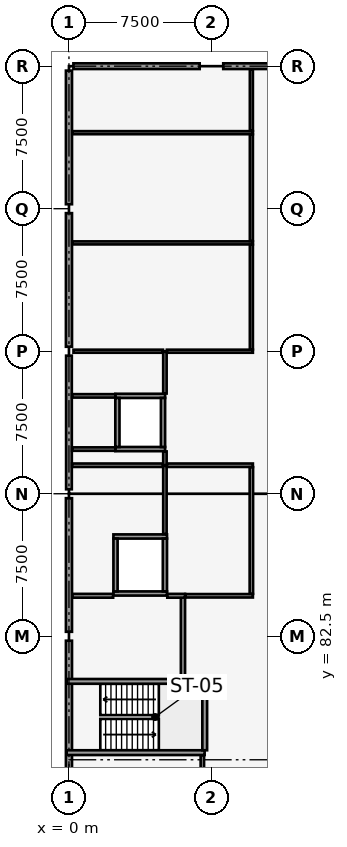
"""IFC4 building model, lengths in metres.
Left out: names, types, materials, properties, quantities, classifications, styles, units other than length and angle.
Written with IfcOpenShell. Run it as: python <this file> out.ifc"""

import sys

from ifc_helpers import new_model, si_unit, direction, frame, frame_2d, origin, origin_2d, place, context, subcontext, project, spatial, rectangle, extrude, element, fill, save


model = new_model("IFC4")
c1 = context("Model", 3, precision=1e-05, world=origin(), true_north=direction((0.0, 1.0)))
c2 = subcontext(c1, "Body", "Model", "MODEL_VIEW")
j1 = project(units=[si_unit("LENGTHUNIT", "METRE"), si_unit("PLANEANGLEUNIT", "RADIAN")], contexts=[c1])
p1 = place(None, origin())
s1 = spatial("IfcSite", under=j1, at=p1, CompositionType="ELEMENT")
p2 = place(p1, origin())
s2 = spatial("IfcBuilding", under=s1, at=p2, CompositionType="ELEMENT")
p3 = place(p2, frame((0.0, 0.0, 21.0)))
s3 = spatial("IfcBuildingStorey", under=s2, at=p3, CompositionType="ELEMENT", Elevation=21.0)
for number, where, z_axis, x_axis in (
    (1, (0.0, 82.5, 0.0), (0.0, 0.0, 1.0), (1.0, 0.0, 0.0)),
    (2, (0.0, 90.0, 0.0), (0.0, 0.0, 1.0), (1.0, 0.0, 0.0)),
    (3, (0.0, 97.5, 0.0), (0.0, 0.0, 1.0), (1.0, 0.0, 0.0)),
    (4, (0.0, 105.0, 0.0), (0.0, 0.0, 1.0), (1.0, 0.0, 0.0)),
    (5, (0.0, 112.5, 0.0), (0.0, 0.0, 1.0), (1.0, 0.0, 0.0)),
):
    element("IfcColumn", number, at=place(p3, frame(where, z_axis=z_axis, x_axis=x_axis)), inside=s3, PredefinedType="COLUMN", context=c2, shape_type="SweptSolid", body=[
        extrude(rectangle(XDim=0.45, YDim=0.45, at=origin_2d()), origin(), (0.0, 0.0, 1.0), 4.2),
    ])
p4 = place(p3, frame((0.235, 112.5, 0.0), z_axis=(0.0, 0.0, 1.0), x_axis=(1.0, 0.0, 0.0)))
e6 = element("IfcWall", 6, at=p4, inside=s3, PredefinedType="SOLIDWALL", context=c2, shape_type="SweptSolid", body=[
    extrude(rectangle(XDim=6.645, YDim=0.3, at=frame_2d((3.322, 0.0))), origin(), (0.0, 0.0, 1.0), 2.89),
])
p5 = place(p4, frame((2.79, 0.0, 0.6)))
e7 = element("IfcOpeningElement", 7, at=p5, cuts=e6, PredefinedType="OPENING", context=c2, shape_type="SweptSolid", body=[
    extrude(rectangle(XDim=1.45, YDim=1.3, at=frame_2d((0.725, 0.65))), frame((0.0, 0.16, 0.0), z_axis=(0.0, -1.0, 0.0), x_axis=(1.0, 0.0, 0.0)), (0.0, 0.0, 1.0), 0.32),
])
p6 = place(p3, frame((8.12, 112.5, 0.0), z_axis=(0.0, 0.0, 1.0), x_axis=(1.0, 0.0, 0.0)))
e8 = element("IfcWall", 8, at=p6, inside=s3, PredefinedType="SOLIDWALL", context=c2, shape_type="SweptSolid", body=[
    extrude(rectangle(XDim=6.645, YDim=0.3, at=frame_2d((3.322, 0.0))), origin(), (0.0, 0.0, 1.0), 2.89),
])
p7 = place(p6, frame((2.33, 0.0, 0.6)))
e9 = element("IfcOpeningElement", 9, at=p7, cuts=e8, PredefinedType="OPENING", context=c2, shape_type="SweptSolid", body=[
    extrude(rectangle(XDim=1.6, YDim=1.3, at=frame_2d((0.8, 0.65))), frame((0.0, 0.16, 0.0), z_axis=(0.0, -1.0, 0.0), x_axis=(1.0, 0.0, 0.0)), (0.0, 0.0, 1.0), 0.32),
])
for number, where, z_axis, x_axis in (
    (10, (0.0, 75.235, 0.0), (0.0, 0.0, 1.0), (0.0, 1.0, 0.0)),
    (11, (0.0, 82.735, 0.0), (0.0, 0.0, 1.0), (0.0, 1.0, 0.0)),
):
    element("IfcWall", number, at=place(p3, frame(where, z_axis=z_axis, x_axis=x_axis)), inside=s3, PredefinedType="SOLIDWALL", context=c2, shape_type="SweptSolid", body=[
        extrude(rectangle(XDim=7.03, YDim=0.32, at=frame_2d((3.515, 0.0))), origin(), (0.0, 0.0, 1.0), 2.89),
    ])
p8 = place(p3, frame((0.0, 90.235, 0.0), z_axis=(0.0, 0.0, 1.0), x_axis=(0.0, 1.0, 0.0)))
e12 = element("IfcWall", 12, at=p8, inside=s3, PredefinedType="SOLIDWALL", context=c2, shape_type="SweptSolid", body=[
    extrude(rectangle(XDim=7.03, YDim=0.3, at=frame_2d((3.515, 0.0))), origin(), (0.0, 0.0, 1.0), 2.89),
])
p9 = place(p8, frame((2.765, 0.0, 0.6)))
e13 = element("IfcOpeningElement", 13, at=p9, cuts=e12, PredefinedType="OPENING", context=c2, shape_type="SweptSolid", body=[
    extrude(rectangle(XDim=1.5, YDim=1.2, at=frame_2d((0.75, 0.6))), frame((0.0, 0.16, 0.0), z_axis=(0.0, -1.0, 0.0), x_axis=(1.0, 0.0, 0.0)), (0.0, 0.0, 1.0), 0.32),
])
p10 = place(p8, frame((5.163, 0.0, 0.6)))
e14 = element("IfcOpeningElement", 14, at=p10, cuts=e12, PredefinedType="OPENING", context=c2, shape_type="SweptSolid", body=[
    extrude(rectangle(XDim=1.65, YDim=1.15, at=frame_2d((0.825, 0.575))), frame((0.0, 0.16, 0.0), z_axis=(0.0, -1.0, 0.0), x_axis=(1.0, 0.0, 0.0)), (0.0, 0.0, 1.0), 0.32),
])
for number, where, z_axis, x_axis in (
    (15, (0.0, 97.735, 0.0), (0.0, 0.0, 1.0), (0.0, 1.0, 0.0)),
    (16, (0.0, 105.235, 0.0), (0.0, 0.0, 1.0), (0.0, 1.0, 0.0)),
):
    element("IfcWall", number, at=place(p3, frame(where, z_axis=z_axis, x_axis=x_axis)), inside=s3, PredefinedType="SOLIDWALL", context=c2, shape_type="SweptSolid", body=[
        extrude(rectangle(XDim=7.03, YDim=0.32, at=frame_2d((3.515, 0.0))), origin(), (0.0, 0.0, 1.0), 2.89),
    ])
p11 = place(p3, frame((-0.12, 76.375, 0.0), z_axis=(0.0, 0.0, 1.0), x_axis=(1.0, 0.0, 0.0)))
e17 = element("IfcWall", 17, at=p11, inside=s3, PredefinedType="SOLIDWALL", context=c2, shape_type="SweptSolid", body=[
    extrude(rectangle(XDim=7.26, YDim=0.25, at=frame_2d((3.63, 0.0))), origin(), (0.0, 0.0, 1.0), 3.92),
])
p12 = place(p3, frame((-0.12, 80.125, 0.0), z_axis=(0.0, 0.0, 1.0), x_axis=(1.0, 0.0, 0.0)))
e18 = element("IfcWall", 18, at=p12, inside=s3, PredefinedType="SOLIDWALL", context=c2, shape_type="SweptSolid", body=[
    extrude(rectangle(XDim=7.26, YDim=0.25, at=frame_2d((3.63, 0.0))), origin(), (0.0, 0.0, 1.0), 3.92),
])
p13 = place(p12, frame((0.45, 0.0, 0.0)))
e19 = element("IfcOpeningElement", 19, at=p13, cuts=e18, PredefinedType="OPENING", context=c2, shape_type="SweptSolid", body=[
    extrude(rectangle(XDim=1.1, YDim=2.15, at=frame_2d((0.55, 1.075))), frame((0.0, 0.135, 0.0), z_axis=(0.0, -1.0, 0.0), x_axis=(1.0, 0.0, 0.0)), (0.0, 0.0, 1.0), 0.27),
])
p14 = place(p3, frame((7.145, 76.5, 0.0), z_axis=(0.0, 0.0, 1.0), x_axis=(0.0, 1.0, 0.0)))
e20 = element("IfcWall", 20, at=p14, inside=s3, PredefinedType="SOLIDWALL", context=c2, shape_type="SweptSolid", body=[
    extrude(rectangle(XDim=3.5, YDim=0.25, at=frame_2d((1.75, 0.0))), origin(), (0.0, 0.0, 1.0), 3.92),
])
for number, where, z_axis, x_axis in (
    (21, (2.44, 92.35, 0.0), (0.0, 0.0, 1.0), (1.0, 0.0, 0.0)),
    (22, (2.44, 95.15, 0.0), (0.0, 0.0, 1.0), (1.0, 0.0, 0.0)),
):
    element("IfcWall", number, at=place(p3, frame(where, z_axis=z_axis, x_axis=x_axis)), inside=s3, PredefinedType="SOLIDWALL", context=c2, shape_type="SweptSolid", body=[
        extrude(rectangle(XDim=2.62, YDim=0.22, at=frame_2d((1.31, 0.0))), origin(), (0.0, 0.0, 1.0), 3.92),
    ])
p15 = place(p3, frame((2.55, 92.46, 0.0), z_axis=(0.0, 0.0, 1.0), x_axis=(0.0, 1.0, 0.0)))
e23 = element("IfcWall", 23, at=p15, inside=s3, PredefinedType="SOLIDWALL", context=c2, shape_type="SweptSolid", body=[
    extrude(rectangle(XDim=2.58, YDim=0.22, at=frame_2d((1.29, 0.0))), origin(), (0.0, 0.0, 1.0), 3.92),
])
p16 = place(p3, frame((4.95, 92.46, 0.0), z_axis=(0.0, 0.0, 1.0), x_axis=(0.0, 1.0, 0.0)))
e24 = element("IfcWall", 24, at=p16, inside=s3, PredefinedType="SOLIDWALL", context=c2, shape_type="SweptSolid", body=[
    extrude(rectangle(XDim=2.58, YDim=0.22, at=frame_2d((1.29, 0.0))), origin(), (0.0, 0.0, 1.0), 3.92),
])
p17 = place(p16, frame((0.79, 0.0, 0.0)))
e25 = element("IfcOpeningElement", 25, at=p17, cuts=e24, PredefinedType="OPENING", context=c2, shape_type="SweptSolid", body=[
    extrude(rectangle(XDim=1.0, YDim=2.15, at=frame_2d((0.5, 1.075))), frame((0.0, 0.12, 0.0), z_axis=(0.0, -1.0, 0.0), x_axis=(1.0, 0.0, 0.0)), (0.0, 0.0, 1.0), 0.24),
])
p18 = place(p3, frame((2.34, 84.75, 0.0), z_axis=(0.0, 0.0, 1.0), x_axis=(1.0, 0.0, 0.0)))
e26 = element("IfcWall", 26, at=p18, inside=s3, PredefinedType="SOLIDWALL", context=c2, shape_type="SweptSolid", body=[
    extrude(rectangle(XDim=2.82, YDim=0.22, at=frame_2d((1.41, 0.0))), origin(), (0.0, 0.0, 1.0), 3.92),
])
p19 = place(p18, frame((0.86, 0.0, 0.0)))
e27 = element("IfcOpeningElement", 27, at=p19, cuts=e26, PredefinedType="OPENING", context=c2, shape_type="SweptSolid", body=[
    extrude(rectangle(XDim=1.1, YDim=2.15, at=frame_2d((0.55, 1.075))), frame((0.0, 0.12, 0.0), z_axis=(0.0, -1.0, 0.0), x_axis=(1.0, 0.0, 0.0)), (0.0, 0.0, 1.0), 0.24),
])
p20 = place(p3, frame((2.34, 87.75, 0.0), z_axis=(0.0, 0.0, 1.0), x_axis=(1.0, 0.0, 0.0)))
e28 = element("IfcWall", 28, at=p20, inside=s3, PredefinedType="SOLIDWALL", context=c2, shape_type="SweptSolid", body=[
    extrude(rectangle(XDim=2.82, YDim=0.22, at=frame_2d((1.41, 0.0))), origin(), (0.0, 0.0, 1.0), 3.92),
])
for number, where, z_axis, x_axis in (
    (29, (2.45, 84.86, 0.0), (0.0, 0.0, 1.0), (0.0, 1.0, 0.0)),
    (30, (5.05, 84.86, 0.0), (0.0, 0.0, 1.0), (0.0, 1.0, 0.0)),
):
    element("IfcWall", number, at=place(p3, frame(where, z_axis=z_axis, x_axis=x_axis)), inside=s3, PredefinedType="SOLIDWALL", context=c2, shape_type="SweptSolid", body=[
        extrude(rectangle(XDim=2.78, YDim=0.22, at=frame_2d((1.39, 0.0))), origin(), (0.0, 0.0, 1.0), 3.92),
    ])
p21 = place(p3, frame((6.0, 80.26, 0.0), z_axis=(0.0, 0.0, 1.0), x_axis=(0.0, 1.0, 0.0)))
e31 = element("IfcWall", 31, at=p21, inside=s3, PredefinedType="SOLIDWALL", context=c2, shape_type="SweptSolid", body=[
    extrude(rectangle(XDim=4.37, YDim=0.22, at=frame_2d((2.185, 0.0))), origin(), (0.0, 0.0, 1.0), 3.92),
])
p22 = place(p21, frame((0.45, 0.0, 0.0)))
e32 = element("IfcOpeningElement", 32, at=p22, cuts=e31, PredefinedType="OPENING", context=c2, shape_type="SweptSolid", body=[
    extrude(rectangle(XDim=1.1, YDim=2.15, at=frame_2d((0.55, 1.075))), frame((0.0, 0.12, 0.0), z_axis=(0.0, -1.0, 0.0), x_axis=(1.0, 0.0, 0.0)), (0.0, 0.0, 1.0), 0.24),
])
p23 = place(p3, frame((0.18, 84.63, 0.0), z_axis=(0.0, 0.0, 1.0), x_axis=(1.0, 0.0, 0.0)))
e33 = element("IfcWall", 33, at=p23, inside=s3, PredefinedType="PARTITIONING", context=c2, shape_type="SweptSolid", body=[
    extrude(rectangle(XDim=2.145, YDim=0.2, at=frame_2d((1.073, 0.0))), origin(), (0.0, 0.0, 1.0), 3.15),
])
p24 = place(p3, frame((5.175, 84.63, 0.0), z_axis=(0.0, 0.0, 1.0), x_axis=(1.0, 0.0, 0.0)))
e34 = element("IfcWall", 34, at=p24, inside=s3, PredefinedType="PARTITIONING", context=c2, shape_type="SweptSolid", body=[
    extrude(rectangle(XDim=0.935, YDim=0.2, at=frame_2d((0.468, 0.0))), origin(), (0.0, 0.0, 1.0), 3.6),
])
p25 = place(p3, frame((7.02, 75.0, 0.0), z_axis=(0.0, 0.0, 1.0), x_axis=(0.0, 1.0, 0.0)))
e35 = element("IfcWall", 35, at=p25, inside=s3, PredefinedType="PARTITIONING", context=c2, shape_type="SweptSolid", body=[
    extrude(rectangle(XDim=1.236, YDim=0.18, at=frame_2d((0.618, 0.0))), origin(), (0.0, 0.0, 1.0), 2.89),
])
p26 = place(p3, frame((5.05, 87.874, 0.0), z_axis=(0.0, 0.0, 1.0), x_axis=(0.0, 1.0, 0.0)))
e36 = element("IfcWall", 36, at=p26, inside=s3, PredefinedType="PARTITIONING", context=c2, shape_type="SweptSolid", body=[
    extrude(rectangle(XDim=3.626, YDim=0.18, at=frame_2d((1.813, 0.0))), origin(), (0.0, 0.0, 1.0), 2.89),
])
p27 = place(p3, frame((6.124, 84.63, 0.0), z_axis=(0.0, 0.0, 1.0), x_axis=(1.0, 0.0, 0.0)))
e37 = element("IfcWall", 37, at=p27, inside=s3, PredefinedType="PARTITIONING", context=c2, shape_type="SweptSolid", body=[
    extrude(rectangle(XDim=3.556, YDim=0.18, at=frame_2d((1.778, 0.0))), origin(), (0.0, 0.0, 1.0), 3.27),
])
p28 = place(p3, frame((0.164, 91.5, 0.0), z_axis=(0.0, 0.0, 1.0), x_axis=(1.0, 0.0, 0.0)))
e38 = element("IfcWall", 38, at=p28, inside=s3, PredefinedType="PARTITIONING", context=c2, shape_type="SweptSolid", body=[
    extrude(rectangle(XDim=4.782, YDim=0.18, at=frame_2d((2.391, 0.0))), origin(), (0.0, 0.0, 1.0), 3.14),
])
p29 = place(p3, frame((5.154, 91.5, 0.0), z_axis=(0.0, 0.0, 1.0), x_axis=(1.0, 0.0, 0.0)))
e39 = element("IfcWall", 39, at=p29, inside=s3, PredefinedType="PARTITIONING", context=c2, shape_type="SweptSolid", body=[
    extrude(rectangle(XDim=4.526, YDim=0.18, at=frame_2d((2.263, 0.0))), origin(), (0.0, 0.0, 1.0), 3.27),
])
p30 = place(p3, frame((9.6, 84.734, 0.0), z_axis=(0.0, 0.0, 1.0), x_axis=(0.0, 1.0, 0.0)))
e40 = element("IfcWall", 40, at=p30, inside=s3, PredefinedType="PARTITIONING", context=c2, shape_type="SweptSolid", body=[
    extrude(rectangle(XDim=6.662, YDim=0.18, at=frame_2d((3.331, 0.0))), origin(), (0.0, 0.0, 1.0), 2.89),
])
p31 = place(p30, frame((2.191, 0.0, 0.0)))
e41 = element("IfcOpeningElement", 41, at=p31, cuts=e40, PredefinedType="OPENING", context=c2, shape_type="SweptSolid", body=[
    extrude(rectangle(XDim=1.15, YDim=2.14, at=frame_2d((0.575, 1.07))), frame((0.0, 0.1, 0.0), z_axis=(0.0, -1.0, 0.0), x_axis=(1.0, 0.0, 0.0)), (0.0, 0.0, 1.0), 0.2),
])
for number, where, z_axis, x_axis in (
    (42, (0.164, 92.35, 0.0), (0.0, 0.0, 1.0), (1.0, 0.0, 0.0)),
    (43, (0.164, 95.15, 0.0), (0.0, 0.0, 1.0), (1.0, 0.0, 0.0)),
):
    element("IfcWall", number, at=place(p3, frame(where, z_axis=z_axis, x_axis=x_axis)), inside=s3, PredefinedType="PARTITIONING", context=c2, shape_type="SweptSolid", body=[
        extrude(rectangle(XDim=2.276, YDim=0.18, at=frame_2d((1.138, 0.0))), origin(), (0.0, 0.0, 1.0), 3.14),
    ])
p32 = place(p3, frame((5.05, 91.5, 0.0), z_axis=(0.0, 0.0, 1.0), x_axis=(0.0, 1.0, 0.0)))
e44 = element("IfcWall", 44, at=p32, inside=s3, PredefinedType="PARTITIONING", context=c2, shape_type="SweptSolid", body=[
    extrude(rectangle(XDim=0.726, YDim=0.18, at=frame_2d((0.363, 0.0))), origin(), (0.0, 0.0, 1.0), 3.27),
])
p33 = place(p3, frame((5.05, 95.274, 0.0), z_axis=(0.0, 0.0, 1.0), x_axis=(0.0, 1.0, 0.0)))
e45 = element("IfcWall", 45, at=p33, inside=s3, PredefinedType="PARTITIONING", context=c2, shape_type="SweptSolid", body=[
    extrude(rectangle(XDim=2.226, YDim=0.18, at=frame_2d((1.113, 0.0))), origin(), (0.0, 0.0, 1.0), 2.89),
])
p34 = place(p3, frame((0.239, 97.5, 0.0), z_axis=(0.0, 0.0, 1.0), x_axis=(1.0, 0.0, 0.0)))
e46 = element("IfcWall", 46, at=p34, inside=s3, PredefinedType="PARTITIONING", context=c2, shape_type="SweptSolid", body=[
    extrude(rectangle(XDim=4.707, YDim=0.16, at=frame_2d((2.354, 0.0))), origin(), (0.0, 0.0, 1.0), 2.89),
])
p35 = place(p3, frame((5.154, 97.5, 0.0), z_axis=(0.0, 0.0, 1.0), x_axis=(1.0, 0.0, 0.0)))
e47 = element("IfcWall", 47, at=p35, inside=s3, PredefinedType="PARTITIONING", context=c2, shape_type="SweptSolid", body=[
    extrude(rectangle(XDim=4.526, YDim=0.16, at=frame_2d((2.263, 0.0))), origin(), (0.0, 0.0, 1.0), 2.89),
])
p36 = place(p3, frame((0.174, 103.2, 0.0), z_axis=(0.0, 0.0, 1.0), x_axis=(1.0, 0.0, 0.0)))
e48 = element("IfcWall", 48, at=p36, inside=s3, PredefinedType="PARTITIONING", context=c2, shape_type="SweptSolid", body=[
    extrude(rectangle(XDim=9.506, YDim=0.16, at=frame_2d((4.753, 0.0))), origin(), (0.0, 0.0, 1.0), 3.27),
])
p37 = place(p3, frame((0.174, 109.0, 0.0), z_axis=(0.0, 0.0, 1.0), x_axis=(1.0, 0.0, 0.0)))
e49 = element("IfcWall", 49, at=p37, inside=s3, PredefinedType="PARTITIONING", context=c2, shape_type="SweptSolid", body=[
    extrude(rectangle(XDim=9.506, YDim=0.16, at=frame_2d((4.753, 0.0))), origin(), (0.0, 0.0, 1.0), 3.14),
])
p38 = place(p3, frame((9.6, 97.594, 0.0), z_axis=(0.0, 0.0, 1.0), x_axis=(0.0, 1.0, 0.0)))
e50 = element("IfcWall", 50, at=p38, inside=s3, PredefinedType="PARTITIONING", context=c2, shape_type="SweptSolid", body=[
    extrude(rectangle(XDim=5.512, YDim=0.16, at=frame_2d((2.756, 0.0))), origin(), (0.0, 0.0, 1.0), 2.89),
])
p39 = place(p38, frame((2.306, 0.0, 0.0)))
e51 = element("IfcOpeningElement", 51, at=p39, cuts=e50, PredefinedType="OPENING", context=c2, shape_type="SweptSolid", body=[
    extrude(rectangle(XDim=0.9, YDim=2.1, at=frame_2d((0.45, 1.05))), frame((0.0, 0.09, 0.0), z_axis=(0.0, -1.0, 0.0), x_axis=(1.0, 0.0, 0.0)), (0.0, 0.0, 1.0), 0.18),
])
p40 = place(p3, frame((9.6, 103.294, 0.0), z_axis=(0.0, 0.0, 1.0), x_axis=(0.0, 1.0, 0.0)))
e52 = element("IfcWall", 52, at=p40, inside=s3, PredefinedType="PARTITIONING", context=c2, shape_type="SweptSolid", body=[
    extrude(rectangle(XDim=5.612, YDim=0.16, at=frame_2d((2.806, 0.0))), origin(), (0.0, 0.0, 1.0), 2.89),
])
p41 = place(p40, frame((2.356, 0.0, 0.0)))
e53 = element("IfcOpeningElement", 53, at=p41, cuts=e52, PredefinedType="OPENING", context=c2, shape_type="SweptSolid", body=[
    extrude(rectangle(XDim=0.9, YDim=2.1, at=frame_2d((0.45, 1.05))), frame((0.0, 0.09, 0.0), z_axis=(0.0, -1.0, 0.0), x_axis=(1.0, 0.0, 0.0)), (0.0, 0.0, 1.0), 0.18),
])
p42 = place(p3, frame((9.6, 109.094, 0.0), z_axis=(0.0, 0.0, 1.0), x_axis=(0.0, 1.0, 0.0)))
e54 = element("IfcWall", 54, at=p42, inside=s3, PredefinedType="PARTITIONING", context=c2, shape_type="SweptSolid", body=[
    extrude(rectangle(XDim=3.242, YDim=0.16, at=frame_2d((1.621, 0.0))), origin(), (0.0, 0.0, 1.0), 2.89),
])
p43 = place(p42, frame((1.181, 0.0, 0.0)))
e55 = element("IfcOpeningElement", 55, at=p43, cuts=e54, PredefinedType="OPENING", context=c2, shape_type="SweptSolid", body=[
    extrude(rectangle(XDim=0.95, YDim=2.1, at=frame_2d((0.475, 1.05))), frame((0.0, 0.09, 0.0), z_axis=(0.0, -1.0, 0.0), x_axis=(1.0, 0.0, 0.0)), (0.0, 0.0, 1.0), 0.18),
])
p44 = place(p5, origin())
e56 = element("IfcWindow", 56, at=p44, inside=s3, PartitioningType="SINGLE_PANEL", PredefinedType="WINDOW", context=c2, shape_type="SweptSolid", body=[
    extrude(rectangle(XDim=1.45, YDim=1.3, at=frame_2d((0.725, 0.65))), frame((0.0, 0.03, 0.0), z_axis=(0.0, -1.0, 0.0), x_axis=(1.0, 0.0, 0.0)), (0.0, 0.0, 1.0), 0.06),
])
fill(e7, e56)
p45 = place(p9, origin())
e57 = element("IfcWindow", 57, at=p45, inside=s3, PartitioningType="SINGLE_PANEL", PredefinedType="WINDOW", context=c2, shape_type="SweptSolid", body=[
    extrude(rectangle(XDim=1.5, YDim=1.2, at=frame_2d((0.75, 0.6))), frame((0.0, 0.03, 0.0), z_axis=(0.0, -1.0, 0.0), x_axis=(1.0, 0.0, 0.0)), (0.0, 0.0, 1.0), 0.06),
])
fill(e13, e57)
p46 = place(p10, origin())
e58 = element("IfcWindow", 58, at=p46, inside=s3, PartitioningType="SINGLE_PANEL", PredefinedType="WINDOW", context=c2, shape_type="SweptSolid", body=[
    extrude(rectangle(XDim=1.65, YDim=1.15, at=frame_2d((0.825, 0.575))), frame((0.0, 0.03, 0.0), z_axis=(0.0, -1.0, 0.0), x_axis=(1.0, 0.0, 0.0)), (0.0, 0.0, 1.0), 0.06),
])
fill(e14, e58)
p47 = place(p13, origin())
e59 = element("IfcDoor", 59, at=p47, inside=s3, OperationType="SINGLE_SWING_LEFT", PredefinedType="DOOR", context=c2, shape_type="SweptSolid", body=[
    extrude(rectangle(XDim=1.1, YDim=2.15, at=frame_2d((0.55, 1.075))), frame((0.0, 0.025, 0.0), z_axis=(0.0, -1.0, 0.0), x_axis=(1.0, 0.0, 0.0)), (0.0, 0.0, 1.0), 0.05),
])
fill(e19, e59)
p48 = place(p17, origin())
e60 = element("IfcDoor", 60, at=p48, inside=s3, OperationType="SLIDING_TO_LEFT", PredefinedType="DOOR", context=c2, shape_type="SweptSolid", body=[
    extrude(rectangle(XDim=1.0, YDim=2.15, at=frame_2d((0.5, 1.075))), frame((0.0, 0.025, 0.0), z_axis=(0.0, -1.0, 0.0), x_axis=(1.0, 0.0, 0.0)), (0.0, 0.0, 1.0), 0.05),
])
fill(e25, e60)
p49 = place(p19, origin())
e61 = element("IfcDoor", 61, at=p49, inside=s3, OperationType="SLIDING_TO_LEFT", PredefinedType="DOOR", context=c2, shape_type="SweptSolid", body=[
    extrude(rectangle(XDim=1.1, YDim=2.15, at=frame_2d((0.55, 1.075))), frame((0.0, 0.025, 0.0), z_axis=(0.0, -1.0, 0.0), x_axis=(1.0, 0.0, 0.0)), (0.0, 0.0, 1.0), 0.05),
])
fill(e27, e61)
p50 = place(p22, origin())
e62 = element("IfcDoor", 62, at=p50, inside=s3, OperationType="SINGLE_SWING_RIGHT", PredefinedType="DOOR", context=c2, shape_type="SweptSolid", body=[
    extrude(rectangle(XDim=1.1, YDim=2.15, at=frame_2d((0.55, 1.075))), frame((0.0, 0.025, 0.0), z_axis=(0.0, -1.0, 0.0), x_axis=(1.0, 0.0, 0.0)), (0.0, 0.0, 1.0), 0.05),
])
fill(e32, e62)
p51 = place(p31, origin())
e63 = element("IfcDoor", 63, at=p51, inside=s3, OperationType="SINGLE_SWING_LEFT", PredefinedType="DOOR", context=c2, shape_type="SweptSolid", body=[
    extrude(rectangle(XDim=1.15, YDim=2.14, at=frame_2d((0.575, 1.07))), frame((0.0, 0.025, 0.0), z_axis=(0.0, -1.0, 0.0), x_axis=(1.0, 0.0, 0.0)), (0.0, 0.0, 1.0), 0.05),
])
fill(e41, e63)
p52 = place(p39, origin())
e64 = element("IfcDoor", 64, at=p52, inside=s3, OperationType="SINGLE_SWING_RIGHT", PredefinedType="DOOR", context=c2, shape_type="SweptSolid", body=[
    extrude(rectangle(XDim=0.9, YDim=2.1, at=frame_2d((0.45, 1.05))), frame((0.0, 0.025, 0.0), z_axis=(0.0, -1.0, 0.0), x_axis=(1.0, 0.0, 0.0)), (0.0, 0.0, 1.0), 0.05),
])
fill(e51, e64)
p53 = place(p41, origin())
e65 = element("IfcDoor", 65, at=p53, inside=s3, OperationType="SINGLE_SWING_LEFT", PredefinedType="DOOR", context=c2, shape_type="SweptSolid", body=[
    extrude(rectangle(XDim=0.9, YDim=2.1, at=frame_2d((0.45, 1.05))), frame((0.0, 0.025, 0.0), z_axis=(0.0, -1.0, 0.0), x_axis=(1.0, 0.0, 0.0)), (0.0, 0.0, 1.0), 0.05),
])
fill(e53, e65)
p54 = place(p43, origin())
e66 = element("IfcDoor", 66, at=p54, inside=s3, OperationType="SINGLE_SWING_RIGHT", PredefinedType="DOOR", context=c2, shape_type="SweptSolid", body=[
    extrude(rectangle(XDim=0.95, YDim=2.1, at=frame_2d((0.475, 1.05))), frame((0.0, 0.025, 0.0), z_axis=(0.0, -1.0, 0.0), x_axis=(1.0, 0.0, 0.0)), (0.0, 0.0, 1.0), 0.05),
])
fill(e55, e66)
save(model, sys.argv[1])
